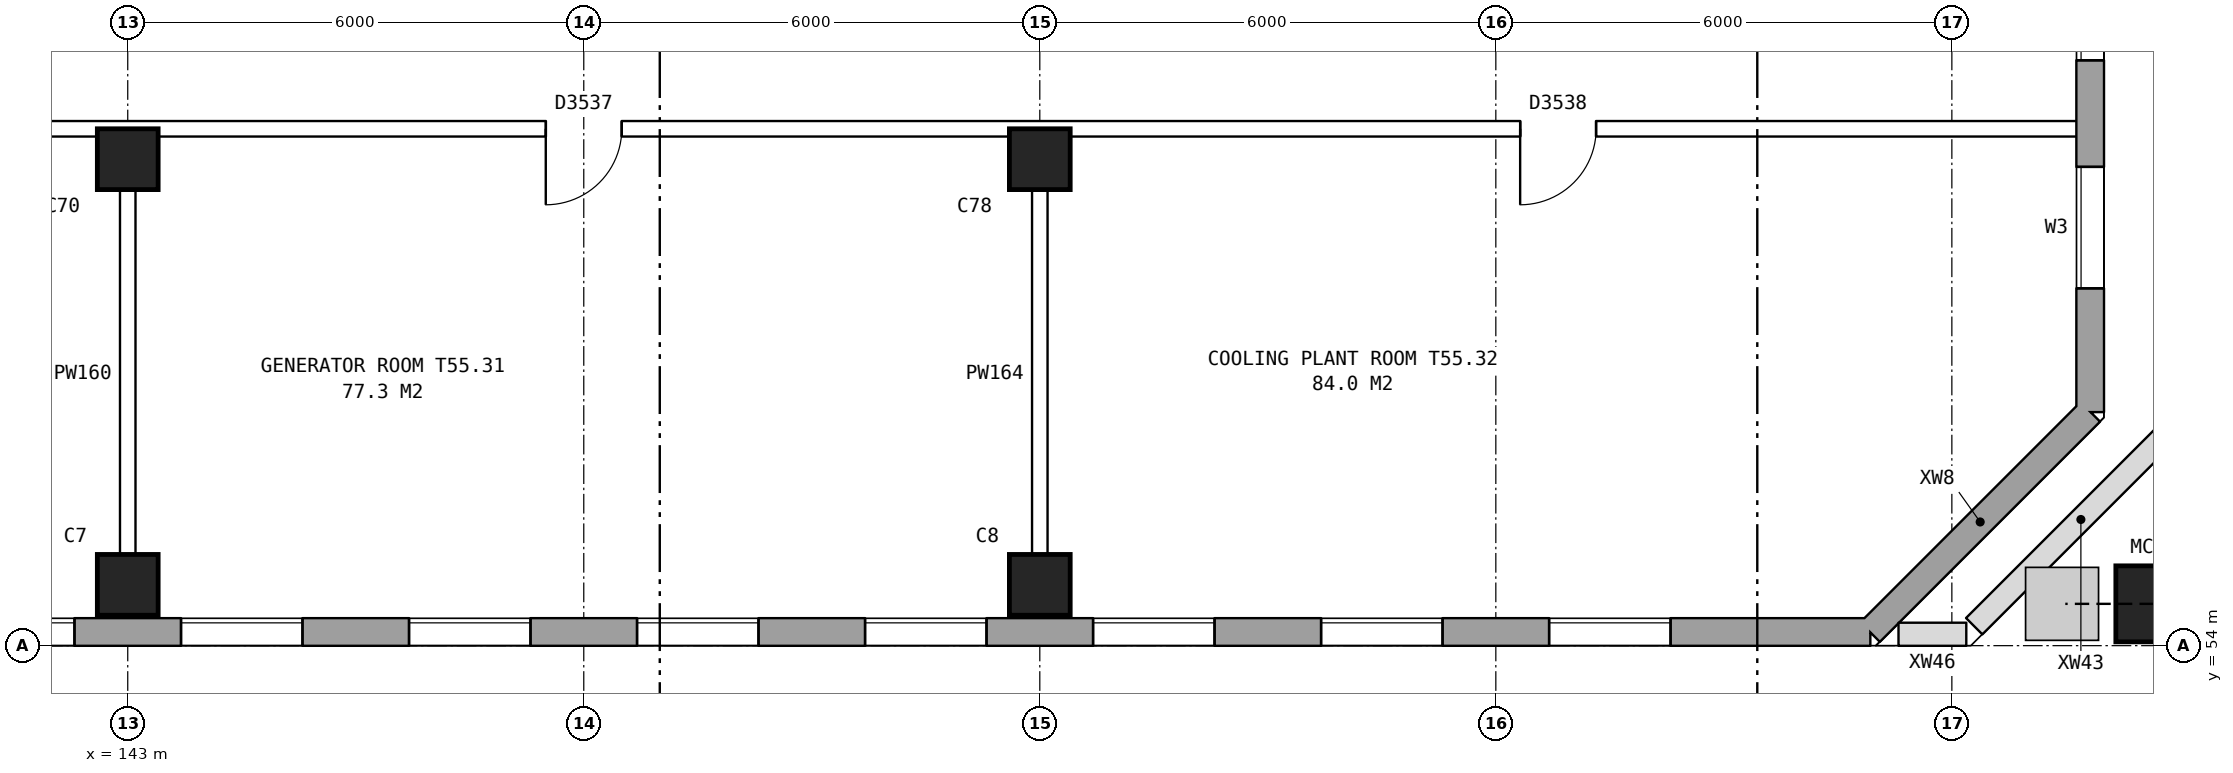
"""IFC4 building model, lengths in metres.
Left out: names, types, materials, properties, quantities, classifications, styles, units other than length and angle.
Written with IfcOpenShell. Run it as: python <this file> out.ifc"""

import sys

from ifc_helpers import new_model, si_unit, direction, frame, frame_2d, origin, origin_2d, place, context, subcontext, project, spatial, rectangle, hollow_rectangle, extrude, element, fill, save


model = new_model("IFC4")
c1 = context("Model", 3, precision=1e-05, world=origin(), true_north=direction((0.0, 1.0)))
c2 = subcontext(c1, "Body", "Model", "MODEL_VIEW")
j1 = project(units=[si_unit("LENGTHUNIT", "METRE"), si_unit("PLANEANGLEUNIT", "RADIAN")], contexts=[c1])
p1 = place(None, origin())
s1 = spatial("IfcSite", under=j1, at=p1, CompositionType="ELEMENT")
p2 = place(p1, origin())
s2 = spatial("IfcBuilding", under=s1, at=p2, CompositionType="ELEMENT")
p3 = place(p2, frame((0.0, 0.0, 194.4)))
s3 = spatial("IfcBuildingStorey", under=s2, at=p3, CompositionType="ELEMENT", Elevation=194.4)
for number, where, z_axis, x_axis in (
    (1, (143.0, 54.8, 0.0), (0.0, 0.0, 1.0), (1.0, 0.0, 0.0)),
    (2, (143.0, 60.4, 0.0), (0.0, 0.0, 1.0), (1.0, 0.0, 0.0)),
    (3, (155.0, 54.8, 0.0), (0.0, 0.0, 1.0), (1.0, 0.0, 0.0)),
    (4, (155.0, 60.4, 0.0), (0.0, 0.0, 1.0), (1.0, 0.0, 0.0)),
):
    element("IfcColumn", number, at=place(p3, frame(where, z_axis=z_axis, x_axis=x_axis)), inside=s3, PredefinedType="COLUMN", context=c2, shape_type="SweptSolid", body=[
        extrude(rectangle(XDim=0.8, YDim=0.8, at=origin_2d()), origin(), (0.0, 0.0, 1.0), 3.95),
    ])
p4 = place(p3, frame((169.658, 54.55, 0.143), z_axis=(-0.285274510918, 0.0, 0.95844585315), x_axis=(0.0, -1.0, 0.0)))
e5 = element("IfcColumn", 5, at=p4, inside=s3, PredefinedType="COLUMN", context=c2, shape_type="SweptSolid", body=[
    extrude(hollow_rectangle(XDim=1.0, YDim=1.0, WallThickness=0.055, at=origin_2d()), origin(), (0.0, 0.0, 1.0), 4.085),
])
p5 = place(p3, frame((132.05, 54.18, 0.0), z_axis=(0.0, 0.0, 1.0), x_axis=(1.0, 0.0, 0.0)))
e6 = element("IfcWall", 6, at=p5, inside=s3, PredefinedType="STANDARD", context=c2, shape_type="SweptSolid", body=[
    extrude(rectangle(XDim=33.875, YDim=0.36, at=frame_2d((16.938, 0.0))), origin(), (0.0, 0.0, 1.0), 3.95),
])
p6 = place(p5, frame((2.65, 0.0, 1.5)))
e7 = element("IfcOpeningElement", 7, at=p6, cuts=e6, PredefinedType="OPENING", context=c2, shape_type="SweptSolid", body=[
    extrude(rectangle(XDim=1.6, YDim=1.2, at=frame_2d((0.8, 0.6))), frame((0.0, 0.19, 0.0), z_axis=(0.0, -1.0, 0.0), x_axis=(1.0, 0.0, 0.0)), (0.0, 0.0, 1.0), 0.38),
])
p7 = place(p5, frame((5.65, 0.0, 1.5)))
e8 = element("IfcOpeningElement", 8, at=p7, cuts=e6, PredefinedType="OPENING", context=c2, shape_type="SweptSolid", body=[
    extrude(rectangle(XDim=1.6, YDim=1.2, at=frame_2d((0.8, 0.6))), frame((0.0, 0.19, 0.0), z_axis=(0.0, -1.0, 0.0), x_axis=(1.0, 0.0, 0.0)), (0.0, 0.0, 1.0), 0.38),
])
p8 = place(p5, frame((8.65, 0.0, 1.5)))
e9 = element("IfcOpeningElement", 9, at=p8, cuts=e6, PredefinedType="OPENING", context=c2, shape_type="SweptSolid", body=[
    extrude(rectangle(XDim=1.6, YDim=1.2, at=frame_2d((0.8, 0.6))), frame((0.0, 0.19, 0.0), z_axis=(0.0, -1.0, 0.0), x_axis=(1.0, 0.0, 0.0)), (0.0, 0.0, 1.0), 0.38),
])
p9 = place(p5, frame((11.65, 0.0, 1.5)))
e10 = element("IfcOpeningElement", 10, at=p9, cuts=e6, PredefinedType="OPENING", context=c2, shape_type="SweptSolid", body=[
    extrude(rectangle(XDim=1.6, YDim=1.2, at=frame_2d((0.8, 0.6))), frame((0.0, 0.19, 0.0), z_axis=(0.0, -1.0, 0.0), x_axis=(1.0, 0.0, 0.0)), (0.0, 0.0, 1.0), 0.38),
])
p10 = place(p5, frame((14.65, 0.0, 1.5)))
e11 = element("IfcOpeningElement", 11, at=p10, cuts=e6, PredefinedType="OPENING", context=c2, shape_type="SweptSolid", body=[
    extrude(rectangle(XDim=1.6, YDim=1.2, at=frame_2d((0.8, 0.6))), frame((0.0, 0.19, 0.0), z_axis=(0.0, -1.0, 0.0), x_axis=(1.0, 0.0, 0.0)), (0.0, 0.0, 1.0), 0.38),
])
p11 = place(p5, frame((17.65, 0.0, 1.5)))
e12 = element("IfcOpeningElement", 12, at=p11, cuts=e6, PredefinedType="OPENING", context=c2, shape_type="SweptSolid", body=[
    extrude(rectangle(XDim=1.6, YDim=1.2, at=frame_2d((0.8, 0.6))), frame((0.0, 0.19, 0.0), z_axis=(0.0, -1.0, 0.0), x_axis=(1.0, 0.0, 0.0)), (0.0, 0.0, 1.0), 0.38),
])
p12 = place(p5, frame((20.65, 0.0, 1.5)))
e13 = element("IfcOpeningElement", 13, at=p12, cuts=e6, PredefinedType="OPENING", context=c2, shape_type="SweptSolid", body=[
    extrude(rectangle(XDim=1.6, YDim=1.2, at=frame_2d((0.8, 0.6))), frame((0.0, 0.19, 0.0), z_axis=(0.0, -1.0, 0.0), x_axis=(1.0, 0.0, 0.0)), (0.0, 0.0, 1.0), 0.38),
])
p13 = place(p5, frame((23.65, 0.0, 1.5)))
e14 = element("IfcOpeningElement", 14, at=p13, cuts=e6, PredefinedType="OPENING", context=c2, shape_type="SweptSolid", body=[
    extrude(rectangle(XDim=1.6, YDim=1.2, at=frame_2d((0.8, 0.6))), frame((0.0, 0.19, 0.0), z_axis=(0.0, -1.0, 0.0), x_axis=(1.0, 0.0, 0.0)), (0.0, 0.0, 1.0), 0.38),
])
p14 = place(p5, frame((26.65, 0.0, 1.5)))
e15 = element("IfcOpeningElement", 15, at=p14, cuts=e6, PredefinedType="OPENING", context=c2, shape_type="SweptSolid", body=[
    extrude(rectangle(XDim=1.6, YDim=1.2, at=frame_2d((0.8, 0.6))), frame((0.0, 0.19, 0.0), z_axis=(0.0, -1.0, 0.0), x_axis=(1.0, 0.0, 0.0)), (0.0, 0.0, 1.0), 0.38),
])
p15 = place(p5, frame((29.65, 0.0, 1.5)))
e16 = element("IfcOpeningElement", 16, at=p15, cuts=e6, PredefinedType="OPENING", context=c2, shape_type="SweptSolid", body=[
    extrude(rectangle(XDim=1.6, YDim=1.2, at=frame_2d((0.8, 0.6))), frame((0.0, 0.19, 0.0), z_axis=(0.0, -1.0, 0.0), x_axis=(1.0, 0.0, 0.0)), (0.0, 0.0, 1.0), 0.38),
])
p16 = place(p3, frame((165.925, 54.18, 0.0), z_axis=(0.0, 0.0, 1.0), x_axis=(0.707106781187, 0.707106781187, 0.0)))
e17 = element("IfcWall", 17, at=p16, inside=s3, PredefinedType="STANDARD", context=c2, shape_type="SweptSolid", body=[
    extrude(rectangle(XDim=4.094, YDim=0.36, at=frame_2d((2.047, 0.0))), origin(), (0.0, 0.0, 1.0), 3.95),
])
p17 = place(p3, frame((168.82, 57.075, 0.0), z_axis=(0.0, 0.0, 1.0), x_axis=(0.0, 1.0, 0.0)))
e18 = element("IfcWall", 18, at=p17, inside=s3, PredefinedType="STANDARD", context=c2, shape_type="SweptSolid", body=[
    extrude(rectangle(XDim=25.851, YDim=0.36, at=frame_2d((12.925, 0.0))), origin(), (0.0, 0.0, 1.0), 3.95),
])
p18 = place(p17, frame((1.625, 0.0, 1.5)))
e19 = element("IfcOpeningElement", 19, at=p18, cuts=e18, PredefinedType="OPENING", context=c2, shape_type="SweptSolid", body=[
    extrude(rectangle(XDim=1.6, YDim=1.2, at=frame_2d((0.8, 0.6))), frame((0.0, 0.19, 0.0), z_axis=(0.0, -1.0, 0.0), x_axis=(1.0, 0.0, 0.0)), (0.0, 0.0, 1.0), 0.38),
])
p19 = place(p17, frame((4.625, 0.0, 1.5)))
e20 = element("IfcOpeningElement", 20, at=p19, cuts=e18, PredefinedType="OPENING", context=c2, shape_type="SweptSolid", body=[
    extrude(rectangle(XDim=1.6, YDim=1.2, at=frame_2d((0.8, 0.6))), frame((0.0, 0.19, 0.0), z_axis=(0.0, -1.0, 0.0), x_axis=(1.0, 0.0, 0.0)), (0.0, 0.0, 1.0), 0.38),
])
p20 = place(p17, frame((19.625, 0.0, 1.5)))
e21 = element("IfcOpeningElement", 21, at=p20, cuts=e18, PredefinedType="OPENING", context=c2, shape_type="SweptSolid", body=[
    extrude(rectangle(XDim=1.6, YDim=1.2, at=frame_2d((0.8, 0.6))), frame((0.0, 0.19, 0.0), z_axis=(0.0, -1.0, 0.0), x_axis=(1.0, 0.0, 0.0)), (0.0, 0.0, 1.0), 0.38),
])
p21 = place(p17, frame((22.625, 0.0, 1.5)))
e22 = element("IfcOpeningElement", 22, at=p21, cuts=e18, PredefinedType="OPENING", context=c2, shape_type="SweptSolid", body=[
    extrude(rectangle(XDim=1.6, YDim=1.2, at=frame_2d((0.8, 0.6))), frame((0.0, 0.19, 0.0), z_axis=(0.0, -1.0, 0.0), x_axis=(1.0, 0.0, 0.0)), (0.0, 0.0, 1.0), 0.38),
])
p22 = place(p3, frame((166.3, 54.15, 0.0), z_axis=(0.0, 0.0, 1.0), x_axis=(1.0, 0.0, 0.0)))
e23 = element("IfcWall", 23, at=p22, inside=s3, PredefinedType="PARAPET", context=c2, shape_type="SweptSolid", body=[
    extrude(rectangle(XDim=0.888, YDim=0.3, at=frame_2d((0.444, 0.0))), origin(), (0.0, 0.0, 1.0), 1.1),
])
p23 = place(p3, frame((167.295, 54.258, 0.0), z_axis=(0.0, 0.0, 1.0), x_axis=(0.707137557743, 0.70707600329, 0.0)))
e24 = element("IfcWall", 24, at=p23, inside=s3, PredefinedType="PARAPET", context=c2, shape_type="SweptSolid", body=[
    extrude(rectangle(XDim=3.966, YDim=0.3, at=frame_2d((1.983, 0.0))), origin(), (0.0, 0.0, 1.0), 1.1),
])
p24 = place(p3, frame((32.24, 60.8, 0.0), z_axis=(0.0, 0.0, 1.0), x_axis=(1.0, 0.0, 0.0)))
e25 = element("IfcWall", 25, at=p24, inside=s3, PredefinedType="PARTITIONING", context=c2, shape_type="SweptSolid", body=[
    extrude(rectangle(XDim=136.52, YDim=0.2, at=frame_2d((68.26, 0.0))), origin(), (0.0, 0.0, 1.0), 3.95),
])
p25 = place(p24, frame((3.44, 0.0, 0.0)))
e26 = element("IfcOpeningElement", 26, at=p25, cuts=e25, PredefinedType="OPENING", context=c2, shape_type="SweptSolid", body=[
    extrude(rectangle(XDim=1.0, YDim=2.1, at=frame_2d((0.5, 1.05))), frame((0.0, 0.11, 0.0), z_axis=(0.0, -1.0, 0.0), x_axis=(1.0, 0.0, 0.0)), (0.0, 0.0, 1.0), 0.22),
])
p26 = place(p24, frame((13.26, 0.0, 0.0)))
e27 = element("IfcOpeningElement", 27, at=p26, cuts=e25, PredefinedType="OPENING", context=c2, shape_type="SweptSolid", body=[
    extrude(rectangle(XDim=1.0, YDim=2.1, at=frame_2d((0.5, 1.05))), frame((0.0, 0.11, 0.0), z_axis=(0.0, -1.0, 0.0), x_axis=(1.0, 0.0, 0.0)), (0.0, 0.0, 1.0), 0.22),
])
p27 = place(p24, frame((25.26, 0.0, 0.0)))
e28 = element("IfcOpeningElement", 28, at=p27, cuts=e25, PredefinedType="OPENING", context=c2, shape_type="SweptSolid", body=[
    extrude(rectangle(XDim=1.0, YDim=2.1, at=frame_2d((0.5, 1.05))), frame((0.0, 0.11, 0.0), z_axis=(0.0, -1.0, 0.0), x_axis=(1.0, 0.0, 0.0)), (0.0, 0.0, 1.0), 0.22),
])
p28 = place(p24, frame((37.08, 0.0, 0.0)))
e29 = element("IfcOpeningElement", 29, at=p28, cuts=e25, PredefinedType="OPENING", context=c2, shape_type="SweptSolid", body=[
    extrude(rectangle(XDim=1.0, YDim=2.1, at=frame_2d((0.5, 1.05))), frame((0.0, 0.11, 0.0), z_axis=(0.0, -1.0, 0.0), x_axis=(1.0, 0.0, 0.0)), (0.0, 0.0, 1.0), 0.22),
])
p29 = place(p24, frame((49.955, 0.0, 0.0)))
e30 = element("IfcOpeningElement", 30, at=p29, cuts=e25, PredefinedType="OPENING", context=c2, shape_type="SweptSolid", body=[
    extrude(rectangle(XDim=1.0, YDim=2.1, at=frame_2d((0.5, 1.05))), frame((0.0, 0.11, 0.0), z_axis=(0.0, -1.0, 0.0), x_axis=(1.0, 0.0, 0.0)), (0.0, 0.0, 1.0), 0.22),
])
p30 = place(p24, frame((63.885, 0.0, 0.0)))
e31 = element("IfcOpeningElement", 31, at=p30, cuts=e25, PredefinedType="OPENING", context=c2, shape_type="SweptSolid", body=[
    extrude(rectangle(XDim=1.0, YDim=2.1, at=frame_2d((0.5, 1.05))), frame((0.0, 0.11, 0.0), z_axis=(0.0, -1.0, 0.0), x_axis=(1.0, 0.0, 0.0)), (0.0, 0.0, 1.0), 0.22),
])
p31 = place(p24, frame((77.635, 0.0, 0.0)))
e32 = element("IfcOpeningElement", 32, at=p31, cuts=e25, PredefinedType="OPENING", context=c2, shape_type="SweptSolid", body=[
    extrude(rectangle(XDim=1.0, YDim=2.1, at=frame_2d((0.5, 1.05))), frame((0.0, 0.11, 0.0), z_axis=(0.0, -1.0, 0.0), x_axis=(1.0, 0.0, 0.0)), (0.0, 0.0, 1.0), 0.22),
])
p32 = place(p24, frame((91.565, 0.0, 0.0)))
e33 = element("IfcOpeningElement", 33, at=p32, cuts=e25, PredefinedType="OPENING", context=c2, shape_type="SweptSolid", body=[
    extrude(rectangle(XDim=1.0, YDim=2.1, at=frame_2d((0.5, 1.05))), frame((0.0, 0.11, 0.0), z_axis=(0.0, -1.0, 0.0), x_axis=(1.0, 0.0, 0.0)), (0.0, 0.0, 1.0), 0.22),
])
p33 = place(p24, frame((104.44, 0.0, 0.0)))
e34 = element("IfcOpeningElement", 34, at=p33, cuts=e25, PredefinedType="OPENING", context=c2, shape_type="SweptSolid", body=[
    extrude(rectangle(XDim=1.0, YDim=2.1, at=frame_2d((0.5, 1.05))), frame((0.0, 0.11, 0.0), z_axis=(0.0, -1.0, 0.0), x_axis=(1.0, 0.0, 0.0)), (0.0, 0.0, 1.0), 0.22),
])
p34 = place(p24, frame((116.26, 0.0, 0.0)))
e35 = element("IfcOpeningElement", 35, at=p34, cuts=e25, PredefinedType="OPENING", context=c2, shape_type="SweptSolid", body=[
    extrude(rectangle(XDim=1.0, YDim=2.1, at=frame_2d((0.5, 1.05))), frame((0.0, 0.11, 0.0), z_axis=(0.0, -1.0, 0.0), x_axis=(1.0, 0.0, 0.0)), (0.0, 0.0, 1.0), 0.22),
])
p35 = place(p24, frame((129.08, 0.0, 0.0)))
e36 = element("IfcOpeningElement", 36, at=p35, cuts=e25, PredefinedType="OPENING", context=c2, shape_type="SweptSolid", body=[
    extrude(rectangle(XDim=1.0, YDim=2.1, at=frame_2d((0.5, 1.05))), frame((0.0, 0.11, 0.0), z_axis=(0.0, -1.0, 0.0), x_axis=(1.0, 0.0, 0.0)), (0.0, 0.0, 1.0), 0.22),
])
for number, where, z_axis, x_axis in (
    (37, (143.0, 54.24, 0.0), (0.0, 0.0, 1.0), (0.0, 1.0, 0.0)),
    (38, (155.0, 54.24, 0.0), (0.0, 0.0, 1.0), (0.0, 1.0, 0.0)),
):
    element("IfcWall", number, at=place(p3, frame(where, z_axis=z_axis, x_axis=x_axis)), inside=s3, PredefinedType="PARTITIONING", context=c2, shape_type="SweptSolid", body=[
        extrude(rectangle(XDim=6.66, YDim=0.2, at=frame_2d((3.33, 0.0))), origin(), (0.0, 0.0, 1.0), 3.95),
    ])
p36 = place(p8, origin())
e39 = element("IfcWindow", 39, at=p36, inside=s3, PartitioningType="DOUBLE_PANEL_HORIZONTAL", PredefinedType="WINDOW", context=c2, shape_type="SweptSolid", body=[
    extrude(rectangle(XDim=1.6, YDim=1.2, at=frame_2d((0.8, 0.6))), frame((0.0, 0.15, 0.0), z_axis=(0.0, -1.0, 0.0), x_axis=(1.0, 0.0, 0.0)), (0.0, 0.0, 1.0), 0.06),
])
fill(e9, e39)
p37 = place(p9, origin())
e40 = element("IfcWindow", 40, at=p37, inside=s3, PartitioningType="DOUBLE_PANEL_HORIZONTAL", PredefinedType="WINDOW", context=c2, shape_type="SweptSolid", body=[
    extrude(rectangle(XDim=1.6, YDim=1.2, at=frame_2d((0.8, 0.6))), frame((0.0, 0.15, 0.0), z_axis=(0.0, -1.0, 0.0), x_axis=(1.0, 0.0, 0.0)), (0.0, 0.0, 1.0), 0.06),
])
fill(e10, e40)
p38 = place(p10, origin())
e41 = element("IfcWindow", 41, at=p38, inside=s3, PartitioningType="DOUBLE_PANEL_HORIZONTAL", PredefinedType="WINDOW", context=c2, shape_type="SweptSolid", body=[
    extrude(rectangle(XDim=1.6, YDim=1.2, at=frame_2d((0.8, 0.6))), frame((0.0, 0.15, 0.0), z_axis=(0.0, -1.0, 0.0), x_axis=(1.0, 0.0, 0.0)), (0.0, 0.0, 1.0), 0.06),
])
fill(e11, e41)
p39 = place(p11, origin())
e42 = element("IfcWindow", 42, at=p39, inside=s3, PartitioningType="DOUBLE_PANEL_HORIZONTAL", PredefinedType="WINDOW", context=c2, shape_type="SweptSolid", body=[
    extrude(rectangle(XDim=1.6, YDim=1.2, at=frame_2d((0.8, 0.6))), frame((0.0, 0.15, 0.0), z_axis=(0.0, -1.0, 0.0), x_axis=(1.0, 0.0, 0.0)), (0.0, 0.0, 1.0), 0.06),
])
fill(e12, e42)
p40 = place(p12, origin())
e43 = element("IfcWindow", 43, at=p40, inside=s3, PartitioningType="DOUBLE_PANEL_HORIZONTAL", PredefinedType="WINDOW", context=c2, shape_type="SweptSolid", body=[
    extrude(rectangle(XDim=1.6, YDim=1.2, at=frame_2d((0.8, 0.6))), frame((0.0, 0.15, 0.0), z_axis=(0.0, -1.0, 0.0), x_axis=(1.0, 0.0, 0.0)), (0.0, 0.0, 1.0), 0.06),
])
fill(e13, e43)
p41 = place(p13, origin())
e44 = element("IfcWindow", 44, at=p41, inside=s3, PartitioningType="DOUBLE_PANEL_HORIZONTAL", PredefinedType="WINDOW", context=c2, shape_type="SweptSolid", body=[
    extrude(rectangle(XDim=1.6, YDim=1.2, at=frame_2d((0.8, 0.6))), frame((0.0, 0.15, 0.0), z_axis=(0.0, -1.0, 0.0), x_axis=(1.0, 0.0, 0.0)), (0.0, 0.0, 1.0), 0.06),
])
fill(e14, e44)
p42 = place(p14, origin())
e45 = element("IfcWindow", 45, at=p42, inside=s3, PartitioningType="DOUBLE_PANEL_HORIZONTAL", PredefinedType="WINDOW", context=c2, shape_type="SweptSolid", body=[
    extrude(rectangle(XDim=1.6, YDim=1.2, at=frame_2d((0.8, 0.6))), frame((0.0, 0.15, 0.0), z_axis=(0.0, -1.0, 0.0), x_axis=(1.0, 0.0, 0.0)), (0.0, 0.0, 1.0), 0.06),
])
fill(e15, e45)
p43 = place(p15, origin())
e46 = element("IfcWindow", 46, at=p43, inside=s3, PartitioningType="DOUBLE_PANEL_HORIZONTAL", PredefinedType="WINDOW", context=c2, shape_type="SweptSolid", body=[
    extrude(rectangle(XDim=1.6, YDim=1.2, at=frame_2d((0.8, 0.6))), frame((0.0, 0.15, 0.0), z_axis=(0.0, -1.0, 0.0), x_axis=(1.0, 0.0, 0.0)), (0.0, 0.0, 1.0), 0.06),
])
fill(e16, e46)
p44 = place(p18, origin())
e47 = element("IfcWindow", 47, at=p44, inside=s3, PartitioningType="DOUBLE_PANEL_HORIZONTAL", PredefinedType="WINDOW", context=c2, shape_type="SweptSolid", body=[
    extrude(rectangle(XDim=1.6, YDim=1.2, at=frame_2d((0.8, 0.6))), frame((0.0, 0.15, 0.0), z_axis=(0.0, -1.0, 0.0), x_axis=(1.0, 0.0, 0.0)), (0.0, 0.0, 1.0), 0.06),
])
fill(e19, e47)
p45 = place(p19, origin())
e48 = element("IfcWindow", 48, at=p45, inside=s3, PartitioningType="DOUBLE_PANEL_HORIZONTAL", PredefinedType="WINDOW", context=c2, shape_type="SweptSolid", body=[
    extrude(rectangle(XDim=1.6, YDim=1.2, at=frame_2d((0.8, 0.6))), frame((0.0, 0.15, 0.0), z_axis=(0.0, -1.0, 0.0), x_axis=(1.0, 0.0, 0.0)), (0.0, 0.0, 1.0), 0.06),
])
fill(e20, e48)
p46 = place(p34, frame((1.0, 0.0, 0.0), z_axis=(0.0, 0.0, 1.0), x_axis=(-1.0, 0.0, 0.0)))
e49 = element("IfcDoor", 49, at=p46, inside=s3, OperationType="SINGLE_SWING_RIGHT", PredefinedType="DOOR", context=c2, shape_type="SweptSolid", body=[
    extrude(rectangle(XDim=1.0, YDim=2.1, at=frame_2d((0.5, 1.05))), frame((0.0, 0.025, 0.0), z_axis=(0.0, -1.0, 0.0), x_axis=(1.0, 0.0, 0.0)), (0.0, 0.0, 1.0), 0.05),
])
fill(e35, e49)
p47 = place(p35, frame((1.0, 0.0, 0.0), z_axis=(0.0, 0.0, 1.0), x_axis=(-1.0, 0.0, 0.0)))
e50 = element("IfcDoor", 50, at=p47, inside=s3, OperationType="SINGLE_SWING_RIGHT", PredefinedType="DOOR", context=c2, shape_type="SweptSolid", body=[
    extrude(rectangle(XDim=1.0, YDim=2.1, at=frame_2d((0.5, 1.05))), frame((0.0, 0.025, 0.0), z_axis=(0.0, -1.0, 0.0), x_axis=(1.0, 0.0, 0.0)), (0.0, 0.0, 1.0), 0.05),
])
fill(e36, e50)
save(model, sys.argv[1])
